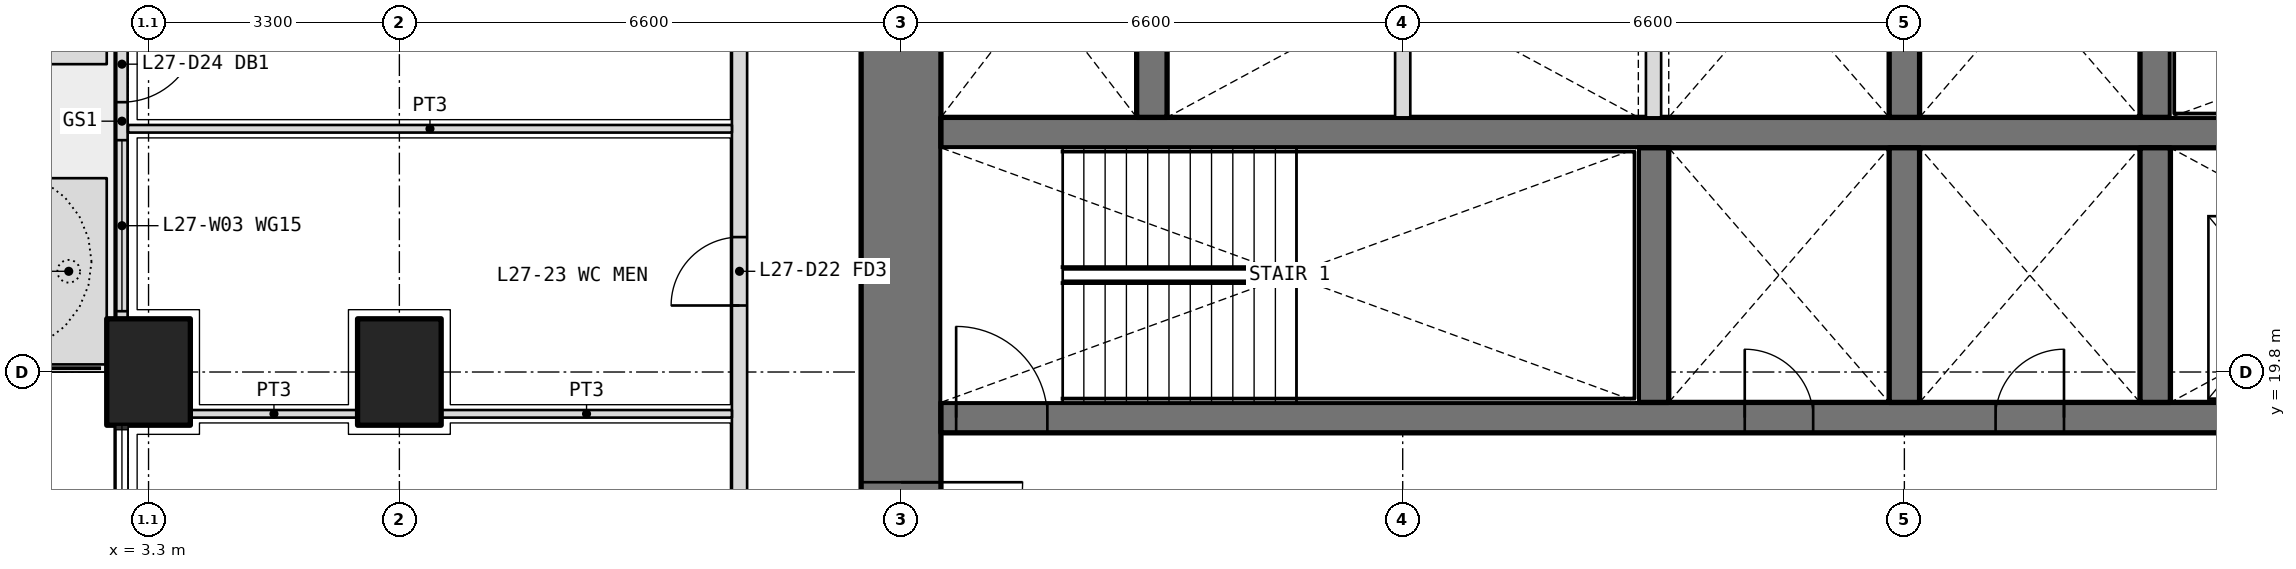
"""IFC4 building model, lengths in metres.
Left out: names, types, materials, properties, quantities, classifications, styles, units other than length and angle.
Written with IfcOpenShell. Run it as: python <this file> out.ifc"""

import sys

from ifc_helpers import new_model, si_unit, direction, frame, frame_2d, origin, origin_2d, place, context, subcontext, project, spatial, polyline, rectangle, outline, extrude, element, fill, save


model = new_model("IFC4")
c1 = context("Model", 3, precision=1e-05, world=origin(), true_north=direction((0.0, 1.0)))
c2 = subcontext(c1, "Body", "Model", "MODEL_VIEW")
j1 = project(units=[si_unit("LENGTHUNIT", "METRE"), si_unit("PLANEANGLEUNIT", "RADIAN")], contexts=[c1])
p1 = place(None, origin())
s1 = spatial("IfcSite", under=j1, at=p1, CompositionType="ELEMENT")
p2 = place(p1, origin())
s2 = spatial("IfcBuilding", under=s1, at=p2, CompositionType="ELEMENT")
p3 = place(p2, frame((0.0, 0.0, 120.0)))
s3 = spatial("IfcBuildingStorey", under=s2, at=p3, CompositionType="ELEMENT", Elevation=120.0)
for number, where, z_axis, x_axis in (
    (1, (3.3, 19.8, 0.0), (0.0, 0.0, 1.0), (0.0, 1.0, 0.0)),
    (2, (6.6, 19.8, 0.0), (0.0, 0.0, 1.0), (0.0, 1.0, 0.0)),
):
    element("IfcColumn", number, at=place(p3, frame(where, z_axis=z_axis, x_axis=x_axis)), inside=s3, PredefinedType="COLUMN", context=c2, shape_type="SweptSolid", body=[
        extrude(rectangle(XDim=1.4, YDim=1.1, at=origin_2d()), origin(), (0.0, 0.0, 1.0), 4.2),
    ])
p4 = place(p3, origin())
e3 = element("IfcWall", 3, at=p4, inside=s3, PredefinedType="USERDEFINED", context=c2, shape_type="SweptSolid", body=[
    extrude(outline(polyline([(1.75, 19.9), (2.75, 19.9), (2.75, 22.35), (1.75, 22.35), (1.75, 19.9)]), holes=[polyline([(1.9, 20.05), (2.6, 20.05), (2.6, 22.2), (1.9, 22.2), (1.9, 20.05)])]), origin(), (0.0, 0.0, 1.0), 1.05),
])
p5 = place(p3, origin())
e4 = element("IfcWall", 4, at=p5, inside=s3, PredefinedType="USERDEFINED", context=c2, shape_type="SweptSolid", body=[
    extrude(outline(polyline([(1.75, 23.85), (2.75, 23.85), (2.75, 32.9), (1.75, 32.9), (1.75, 23.85)]), holes=[polyline([(1.9, 24.0), (2.6, 24.0), (2.6, 32.75), (1.9, 32.75), (1.9, 24.0)])]), origin(), (0.0, 0.0, 1.0), 1.05),
])
p6 = place(p3, frame((2.95, 25.7, 0.0), z_axis=(0.0, 0.0, 1.0), x_axis=(0.0, -1.0, 0.0)))
e5 = element("IfcWall", 5, at=p6, inside=s3, PredefinedType="SOLIDWALL", context=c2, shape_type="SweptSolid", body=[
    extrude(rectangle(XDim=5.2, YDim=0.15, at=frame_2d((2.6, 0.0))), origin(), (0.0, 0.0, 1.0), 2.7),
])
p7 = place(p6, frame((1.35, 0.0, 0.0)))
e6 = element("IfcOpeningElement", 6, at=p7, cuts=e5, PredefinedType="OPENING", context=c2, shape_type="SweptSolid", body=[
    extrude(rectangle(XDim=1.0, YDim=2.4, at=frame_2d((0.5, 1.2))), frame((0.0, 0.085, 0.0), z_axis=(0.0, -1.0, 0.0), x_axis=(1.0, 0.0, 0.0)), (0.0, 0.0, 1.0), 0.17),
])
p8 = place(p6, frame((0.1, 0.0, 0.1)))
e7 = element("IfcOpeningElement", 7, at=p8, cuts=e5, PredefinedType="OPENING", context=c2, shape_type="SweptSolid", body=[
    extrude(rectangle(XDim=1.15, YDim=2.3, at=frame_2d((0.575, 1.15))), frame((0.0, 0.085, 0.0), z_axis=(0.0, -1.0, 0.0), x_axis=(1.0, 0.0, 0.0)), (0.0, 0.0, 1.0), 0.17),
])
p9 = place(p6, frame((2.85, 0.0, 0.1)))
e8 = element("IfcOpeningElement", 8, at=p9, cuts=e5, PredefinedType="OPENING", context=c2, shape_type="SweptSolid", body=[
    extrude(rectangle(XDim=2.25, YDim=2.3, at=frame_2d((1.125, 1.15))), frame((0.0, 0.085, 0.0), z_axis=(0.0, -1.0, 0.0), x_axis=(1.0, 0.0, 0.0)), (0.0, 0.0, 1.0), 0.17),
])
p10 = place(p3, frame((13.2, 32.475, 0.0), z_axis=(0.0, 0.0, 1.0), x_axis=(0.0, -1.0, 0.0)))
e9 = element("IfcWall", 9, at=p10, inside=s3, PredefinedType="SHEAR", context=c2, shape_type="SweptSolid", body=[
    extrude(rectangle(XDim=18.75, YDim=1.05, at=frame_2d((9.375, 0.0))), origin(), (0.0, 0.0, 1.0), 4.2),
])
p11 = place(p10, frame((14.125, 0.0, 0.0)))
e10 = element("IfcOpeningElement", 10, at=p11, cuts=e9, PredefinedType="OPENING", context=c2, shape_type="SweptSolid", body=[
    extrude(rectangle(XDim=1.6, YDim=2.1, at=frame_2d((0.8, 1.05))), frame((0.0, 0.535, 0.0), z_axis=(0.0, -1.0, 0.0), x_axis=(1.0, 0.0, 0.0)), (0.0, 0.0, 1.0), 1.07),
])
p12 = place(p10, frame((3.325, 0.0, 0.0)))
e11 = element("IfcOpeningElement", 11, at=p12, cuts=e9, PredefinedType="OPENING", context=c2, shape_type="SweptSolid", body=[
    extrude(rectangle(XDim=1.6, YDim=2.1, at=frame_2d((0.8, 1.05))), frame((0.0, 0.535, 0.0), z_axis=(0.0, -1.0, 0.0), x_axis=(1.0, 0.0, 0.0)), (0.0, 0.0, 1.0), 1.07),
])
p13 = place(p3, frame((13.725, 19.2, 0.0), z_axis=(0.0, 0.0, 1.0), x_axis=(1.0, 0.0, 0.0)))
e12 = element("IfcWall", 12, at=p13, inside=s3, PredefinedType="SHEAR", context=c2, shape_type="SweptSolid", body=[
    extrude(rectangle(XDim=25.35, YDim=0.4, at=frame_2d((12.675, 0.0))), origin(), (0.0, 0.0, 1.0), 4.2),
])
p14 = place(p13, frame((10.575, 0.0, 0.0)))
e13 = element("IfcOpeningElement", 13, at=p14, cuts=e12, PredefinedType="OPENING", context=c2, shape_type="SweptSolid", body=[
    extrude(rectangle(XDim=0.9, YDim=2.1, at=frame_2d((0.45, 1.05))), frame((0.0, 0.21, 0.0), z_axis=(0.0, -1.0, 0.0), x_axis=(1.0, 0.0, 0.0)), (0.0, 0.0, 1.0), 0.42),
])
p15 = place(p13, frame((13.875, 0.0, 0.0)))
e14 = element("IfcOpeningElement", 14, at=p15, cuts=e12, PredefinedType="OPENING", context=c2, shape_type="SweptSolid", body=[
    extrude(rectangle(XDim=0.9, YDim=2.1, at=frame_2d((0.45, 1.05))), frame((0.0, 0.21, 0.0), z_axis=(0.0, -1.0, 0.0), x_axis=(1.0, 0.0, 0.0)), (0.0, 0.0, 1.0), 0.42),
])
p16 = place(p13, frame((0.2, 0.0, 0.0)))
e15 = element("IfcOpeningElement", 15, at=p16, cuts=e12, PredefinedType="OPENING", context=c2, shape_type="SweptSolid", body=[
    extrude(rectangle(XDim=1.2, YDim=2.1, at=frame_2d((0.6, 1.05))), frame((0.0, 0.21, 0.0), z_axis=(0.0, -1.0, 0.0), x_axis=(1.0, 0.0, 0.0)), (0.0, 0.0, 1.0), 0.42),
])
p17 = place(p13, frame((23.512, 0.0, 0.0)))
e16 = element("IfcOpeningElement", 16, at=p17, cuts=e12, PredefinedType="OPENING", context=c2, shape_type="SweptSolid", body=[
    extrude(rectangle(XDim=1.1, YDim=2.1, at=frame_2d((0.55, 1.05))), frame((0.0, 0.21, 0.0), z_axis=(0.0, -1.0, 0.0), x_axis=(1.0, 0.0, 0.0)), (0.0, 0.0, 1.0), 0.42),
])
p18 = place(p13, frame((17.125, 0.0, 0.0)))
e17 = element("IfcOpeningElement", 17, at=p18, cuts=e12, PredefinedType="OPENING", context=c2, shape_type="SweptSolid", body=[
    extrude(rectangle(XDim=1.1, YDim=2.1, at=frame_2d((0.55, 1.05))), frame((0.0, 0.21, 0.0), z_axis=(0.0, -1.0, 0.0), x_axis=(1.0, 0.0, 0.0)), (0.0, 0.0, 1.0), 0.42),
])
p19 = place(p13, frame((20.325, 0.0, 0.0)))
e18 = element("IfcOpeningElement", 18, at=p19, cuts=e12, PredefinedType="OPENING", context=c2, shape_type="SweptSolid", body=[
    extrude(rectangle(XDim=1.1, YDim=2.1, at=frame_2d((0.55, 1.05))), frame((0.0, 0.21, 0.0), z_axis=(0.0, -1.0, 0.0), x_axis=(1.0, 0.0, 0.0)), (0.0, 0.0, 1.0), 0.42),
])
p20 = place(p3, frame((13.725, 22.95, 0.0), z_axis=(0.0, 0.0, 1.0), x_axis=(1.0, 0.0, 0.0)))
e19 = element("IfcWall", 19, at=p20, inside=s3, PredefinedType="SHEAR", context=c2, shape_type="SweptSolid", body=[
    extrude(rectangle(XDim=25.35, YDim=0.4, at=frame_2d((12.675, 0.0))), origin(), (0.0, 0.0, 1.0), 4.2),
])
for number, where, z_axis, x_axis in (
    (20, (23.1, 19.4, 0.0), (0.0, 0.0, 1.0), (0.0, 1.0, 0.0)),
    (21, (26.4, 19.4, 0.0), (0.0, 0.0, 1.0), (0.0, 1.0, 0.0)),
    (22, (29.7, 19.4, 0.0), (0.0, 0.0, 1.0), (0.0, 1.0, 0.0)),
    (23, (16.5, 23.15, 0.0), (0.0, 0.0, 1.0), (0.0, 1.0, 0.0)),
    (24, (26.4, 23.15, 0.0), (0.0, 0.0, 1.0), (0.0, 1.0, 0.0)),
    (25, (29.7, 23.15, 0.0), (0.0, 0.0, 1.0), (0.0, 1.0, 0.0)),
):
    element("IfcWall", number, at=place(p3, frame(where, z_axis=z_axis, x_axis=x_axis)), inside=s3, PredefinedType="SHEAR", context=c2, shape_type="SweptSolid", body=[
        extrude(rectangle(XDim=3.35, YDim=0.4, at=frame_2d((1.675, 0.0))), origin(), (0.0, 0.0, 1.0), 4.2),
    ])
for number, where, z_axis, x_axis in (
    (26, (19.8, 23.15, 0.0), (0.0, 0.0, 1.0), (0.0, 1.0, 0.0)),
    (27, (23.1, 23.15, 0.0), (0.0, 0.0, 1.0), (0.0, 1.0, 0.0)),
):
    element("IfcWall", number, at=place(p3, frame(where, z_axis=z_axis, x_axis=x_axis)), inside=s3, PredefinedType="PARTITIONING", context=c2, shape_type="SweptSolid", body=[
        extrude(rectangle(XDim=3.35, YDim=0.2, at=frame_2d((1.675, 0.0))), origin(), (0.0, 0.0, 1.0), 4.2),
    ])
p21 = place(p3, frame((11.075, 11.175, 0.0), z_axis=(0.0, 0.0, 1.0), x_axis=(0.0, 1.0, 0.0)))
e28 = element("IfcWall", 28, at=p21, inside=s3, PredefinedType="PARTITIONING", context=c2, shape_type="SweptSolid", body=[
    extrude(rectangle(XDim=27.625, YDim=0.2, at=frame_2d((13.812, 0.0))), origin(), (0.0, 0.0, 1.0), 2.85),
])
p22 = place(p21, frame((0.462, 0.0, 0.0)))
e29 = element("IfcOpeningElement", 29, at=p22, cuts=e28, PredefinedType="OPENING", context=c2, shape_type="SweptSolid", body=[
    extrude(rectangle(XDim=1.0, YDim=2.1, at=frame_2d((0.5, 1.05))), frame((0.0, 0.11, 0.0), z_axis=(0.0, -1.0, 0.0), x_axis=(1.0, 0.0, 0.0)), (0.0, 0.0, 1.0), 0.22),
])
p23 = place(p21, frame((2.575, 0.0, 0.0)))
e30 = element("IfcOpeningElement", 30, at=p23, cuts=e28, PredefinedType="OPENING", context=c2, shape_type="SweptSolid", body=[
    extrude(rectangle(XDim=1.0, YDim=2.1, at=frame_2d((0.5, 1.05))), frame((0.0, 0.11, 0.0), z_axis=(0.0, -1.0, 0.0), x_axis=(1.0, 0.0, 0.0)), (0.0, 0.0, 1.0), 0.22),
])
p24 = place(p21, frame((5.65, 0.0, 0.0)))
e31 = element("IfcOpeningElement", 31, at=p24, cuts=e28, PredefinedType="OPENING", context=c2, shape_type="SweptSolid", body=[
    extrude(rectangle(XDim=0.9, YDim=2.1, at=frame_2d((0.45, 1.05))), frame((0.0, 0.11, 0.0), z_axis=(0.0, -1.0, 0.0), x_axis=(1.0, 0.0, 0.0)), (0.0, 0.0, 1.0), 0.22),
])
p25 = place(p21, frame((9.5, 0.0, 0.0)))
e32 = element("IfcOpeningElement", 32, at=p25, cuts=e28, PredefinedType="OPENING", context=c2, shape_type="SweptSolid", body=[
    extrude(rectangle(XDim=0.9, YDim=2.1, at=frame_2d((0.45, 1.05))), frame((0.0, 0.11, 0.0), z_axis=(0.0, -1.0, 0.0), x_axis=(1.0, 0.0, 0.0)), (0.0, 0.0, 1.0), 0.22),
])
p26 = place(p21, frame((13.025, 0.0, 0.0)))
e33 = element("IfcOpeningElement", 33, at=p26, cuts=e28, PredefinedType="OPENING", context=c2, shape_type="SweptSolid", body=[
    extrude(rectangle(XDim=1.0, YDim=2.1, at=frame_2d((0.5, 1.05))), frame((0.0, 0.11, 0.0), z_axis=(0.0, -1.0, 0.0), x_axis=(1.0, 0.0, 0.0)), (0.0, 0.0, 1.0), 0.22),
])
p27 = place(p21, frame((20.975, 0.0, 0.0)))
e34 = element("IfcOpeningElement", 34, at=p27, cuts=e28, PredefinedType="OPENING", context=c2, shape_type="SweptSolid", body=[
    extrude(rectangle(XDim=1.0, YDim=2.1, at=frame_2d((0.5, 1.05))), frame((0.0, 0.11, 0.0), z_axis=(0.0, -1.0, 0.0), x_axis=(1.0, 0.0, 0.0)), (0.0, 0.0, 1.0), 0.22),
])
p28 = place(p3, frame((3.85, 19.25, 0.0), z_axis=(0.0, 0.0, 1.0), x_axis=(1.0, 0.0, 0.0)))
e35 = element("IfcWall", 35, at=p28, inside=s3, PredefinedType="PARTITIONING", context=c2, shape_type="SweptSolid", body=[
    extrude(rectangle(XDim=2.2, YDim=0.1, at=frame_2d((1.1, 0.0))), origin(), (0.0, 0.0, 1.0), 2.85),
])
p29 = place(p3, frame((7.15, 19.25, 0.0), z_axis=(0.0, 0.0, 1.0), x_axis=(1.0, 0.0, 0.0)))
e36 = element("IfcWall", 36, at=p29, inside=s3, PredefinedType="PARTITIONING", context=c2, shape_type="SweptSolid", body=[
    extrude(rectangle(XDim=3.825, YDim=0.1, at=frame_2d((1.913, 0.0))), origin(), (0.0, 0.0, 1.0), 2.85),
])
p30 = place(p3, frame((3.03, 23.0, 0.0), z_axis=(0.0, 0.0, 1.0), x_axis=(1.0, 0.0, 0.0)))
e37 = element("IfcWall", 37, at=p30, inside=s3, PredefinedType="PARTITIONING", context=c2, shape_type="SweptSolid", body=[
    extrude(rectangle(XDim=7.945, YDim=0.1, at=frame_2d((3.973, 0.0))), origin(), (0.0, 0.0, 1.0), 2.7),
])
p31 = place(p7, origin())
e38 = element("IfcDoor", 38, at=p31, inside=s3, OperationType="SINGLE_SWING_LEFT", PredefinedType="DOOR", context=c2, shape_type="SweptSolid", body=[
    extrude(rectangle(XDim=1.0, YDim=2.4, at=frame_2d((0.5, 1.2))), frame((0.0, 0.025, 0.0), z_axis=(0.0, -1.0, 0.0), x_axis=(1.0, 0.0, 0.0)), (0.0, 0.0, 1.0), 0.05),
])
fill(e6, e38)
p32 = place(p9, origin())
e39 = element("IfcWindow", 39, at=p32, inside=s3, PartitioningType="SINGLE_PANEL", PredefinedType="WINDOW", context=c2, shape_type="SweptSolid", body=[
    extrude(rectangle(XDim=2.25, YDim=2.3, at=frame_2d((1.125, 1.15))), frame((0.0, 0.03, 0.0), z_axis=(0.0, -1.0, 0.0), x_axis=(1.0, 0.0, 0.0)), (0.0, 0.0, 1.0), 0.06),
])
fill(e8, e39)
p33 = place(p25, origin())
e40 = element("IfcDoor", 40, at=p33, inside=s3, OperationType="SINGLE_SWING_LEFT", PredefinedType="DOOR", context=c2, shape_type="SweptSolid", body=[
    extrude(rectangle(XDim=0.9, YDim=2.1, at=frame_2d((0.45, 1.05))), frame((0.0, 0.025, 0.0), z_axis=(0.0, -1.0, 0.0), x_axis=(1.0, 0.0, 0.0)), (0.0, 0.0, 1.0), 0.05),
])
fill(e32, e40)
p34 = place(p14, origin())
e41 = element("IfcDoor", 41, at=p34, inside=s3, OperationType="SINGLE_SWING_LEFT", PredefinedType="DOOR", context=c2, shape_type="SweptSolid", body=[
    extrude(rectangle(XDim=0.9, YDim=2.1, at=frame_2d((0.45, 1.05))), frame((0.0, 0.025, 0.0), z_axis=(0.0, -1.0, 0.0), x_axis=(1.0, 0.0, 0.0)), (0.0, 0.0, 1.0), 0.05),
])
fill(e13, e41)
p35 = place(p15, origin())
e42 = element("IfcDoor", 42, at=p35, inside=s3, OperationType="SINGLE_SWING_RIGHT", PredefinedType="DOOR", context=c2, shape_type="SweptSolid", body=[
    extrude(rectangle(XDim=0.9, YDim=2.1, at=frame_2d((0.45, 1.05))), frame((0.0, 0.025, 0.0), z_axis=(0.0, -1.0, 0.0), x_axis=(1.0, 0.0, 0.0)), (0.0, 0.0, 1.0), 0.05),
])
fill(e14, e42)
p36 = place(p16, origin())
e43 = element("IfcDoor", 43, at=p36, inside=s3, OperationType="SINGLE_SWING_LEFT", PredefinedType="DOOR", context=c2, shape_type="SweptSolid", body=[
    extrude(rectangle(XDim=1.2, YDim=2.1, at=frame_2d((0.6, 1.05))), frame((0.0, 0.025, 0.0), z_axis=(0.0, -1.0, 0.0), x_axis=(1.0, 0.0, 0.0)), (0.0, 0.0, 1.0), 0.05),
])
fill(e15, e43)
p37 = place(p11, origin())
e44 = element("IfcDoor", 44, at=p37, inside=s3, OperationType="DOUBLE_DOOR_DOUBLE_SWING", PredefinedType="DOOR", context=c2, shape_type="SweptSolid", body=[
    extrude(rectangle(XDim=1.6, YDim=2.1, at=frame_2d((0.8, 1.05))), frame((0.0, 0.025, 0.0), z_axis=(0.0, -1.0, 0.0), x_axis=(1.0, 0.0, 0.0)), (0.0, 0.0, 1.0), 0.05),
])
fill(e10, e44)
save(model, sys.argv[1])
